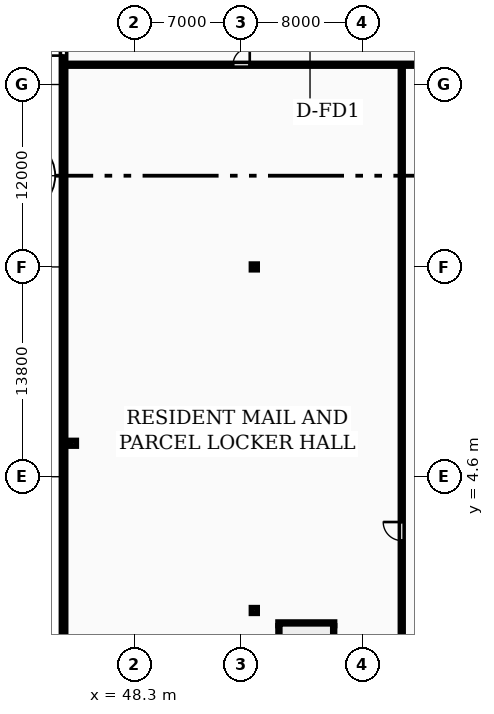
"""IFC4 building model, lengths in metres.
Left out: names, types, materials, properties, quantities, classifications, styles, units other than length and angle.
Written with IfcOpenShell. Run it as: python <this file> out.ifc"""

import sys

from ifc_helpers import new_model, si_unit, direction, frame, frame_2d, origin, origin_2d, place, context, subcontext, project, spatial, rectangle, i_section, extrude, element, fill, save


model = new_model("IFC4")
c1 = context("Model", 3, precision=1e-05, world=origin(), true_north=direction((0.0, 1.0)))
c2 = subcontext(c1, "Body", "Model", "MODEL_VIEW")
j1 = project(units=[si_unit("LENGTHUNIT", "METRE"), si_unit("PLANEANGLEUNIT", "RADIAN")], contexts=[c1])
p1 = place(None, origin())
s1 = spatial("IfcSite", under=j1, at=p1, CompositionType="ELEMENT")
p2 = place(p1, origin())
s2 = spatial("IfcBuilding", under=s1, at=p2, CompositionType="ELEMENT")
p3 = place(p2, origin())
s3 = spatial("IfcBuildingStorey", under=s2, at=p3, CompositionType="ELEMENT", Elevation=0.0)
for number, where, z_axis, x_axis in (
    (1, (56.2, -4.2, 0.0), (0.0, 0.0, 1.0), (1.0, 0.0, 0.0)),
    (2, (56.2, 18.4, 0.0), (0.0, 0.0, 1.0), (1.0, 0.0, 0.0)),
    (3, (44.3, 6.8, 0.0), (0.0, 0.0, 1.0), (1.0, 0.0, 0.0)),
):
    element("IfcColumn", number, at=place(p3, frame(where, z_axis=z_axis, x_axis=x_axis)), inside=s3, PredefinedType="COLUMN", context=c2, shape_type="SweptSolid", body=[
        extrude(i_section(OverallWidth=0.399, OverallDepth=0.394, WebThickness=0.023, FlangeThickness=0.037, FilletRadius=0.015, at=origin_2d()), origin(), (0.0, 0.0, 1.0), 5.4),
    ])
p4 = place(p3, frame((43.65, 109.2, 0.0), z_axis=(0.0, 0.0, 1.0), x_axis=(0.0, -1.0, 0.0)))
e4 = element("IfcWall", 4, at=p4, inside=s3, PredefinedType="STANDARD", context=c2, shape_type="SweptSolid", body=[
    extrude(rectangle(XDim=135.7, YDim=0.3, at=frame_2d((67.85, 0.0))), origin(), (0.0, 0.0, 1.0), 5.1),
])
p5 = place(p4, frame((75.1, 0.0, 0.0)))
e5 = element("IfcOpeningElement", 5, at=p5, cuts=e4, PredefinedType="OPENING", context=c2, shape_type="SweptSolid", body=[
    extrude(rectangle(XDim=1.8, YDim=2.2, at=frame_2d((0.9, 1.1))), frame((0.0, 0.16, 0.0), z_axis=(0.0, -1.0, 0.0), x_axis=(1.0, 0.0, 0.0)), (0.0, 0.0, 1.0), 0.32),
])
p6 = place(p4, frame((28.1, 0.0, 0.0)))
e6 = element("IfcOpeningElement", 6, at=p6, cuts=e4, PredefinedType="OPENING", context=c2, shape_type="SweptSolid", body=[
    extrude(rectangle(XDim=1.8, YDim=2.2, at=frame_2d((0.9, 1.1))), frame((0.0, 0.16, 0.0), z_axis=(0.0, -1.0, 0.0), x_axis=(1.0, 0.0, 0.0)), (0.0, 0.0, 1.0), 0.32),
])
p7 = place(p4, frame((36.0, 0.0, 0.0)))
e7 = element("IfcOpeningElement", 7, at=p7, cuts=e4, PredefinedType="OPENING", context=c2, shape_type="SweptSolid", body=[
    extrude(rectangle(XDim=2.0, YDim=2.6, at=frame_2d((1.0, 1.3))), frame((0.0, 0.16, 0.0), z_axis=(0.0, -1.0, 0.0), x_axis=(1.0, 0.0, 0.0)), (0.0, 0.0, 1.0), 0.32),
])
p8 = place(p4, frame((48.0, 0.0, 0.0)))
e8 = element("IfcOpeningElement", 8, at=p8, cuts=e4, PredefinedType="OPENING", context=c2, shape_type="SweptSolid", body=[
    extrude(rectangle(XDim=1.8, YDim=2.2, at=frame_2d((0.9, 1.1))), frame((0.0, 0.16, 0.0), z_axis=(0.0, -1.0, 0.0), x_axis=(1.0, 0.0, 0.0)), (0.0, 0.0, 1.0), 0.32),
])
p9 = place(p4, frame((122.8, 0.0, 0.0)))
e9 = element("IfcOpeningElement", 9, at=p9, cuts=e4, PredefinedType="OPENING", context=c2, shape_type="SweptSolid", body=[
    extrude(rectangle(XDim=1.8, YDim=2.2, at=frame_2d((0.9, 1.1))), frame((0.0, 0.16, 0.0), z_axis=(0.0, -1.0, 0.0), x_axis=(1.0, 0.0, 0.0)), (0.0, 0.0, 1.0), 0.32),
])
p10 = place(p3, frame((57.875, -12.8, 0.0), z_axis=(0.0, 0.0, 1.0), x_axis=(0.0, 1.0, 0.0)))
e10 = element("IfcWall", 10, at=p10, inside=s3, PredefinedType="SHEAR", context=c2, shape_type="SweptSolid", body=[
    extrude(rectangle(XDim=7.6, YDim=0.25, at=frame_2d((3.8, 0.0))), origin(), (0.0, 0.0, 1.0), 5.4),
])
p11 = place(p3, frame((57.75, -5.075, 0.0), z_axis=(0.0, 0.0, 1.0), x_axis=(1.0, 0.0, 0.0)))
e11 = element("IfcWall", 11, at=p11, inside=s3, PredefinedType="SHEAR", context=c2, shape_type="SweptSolid", body=[
    extrude(rectangle(XDim=3.74, YDim=0.25, at=frame_2d((1.87, 0.0))), origin(), (0.0, 0.0, 1.0), 5.4),
])
p12 = place(p3, frame((61.365, -12.8, 0.0), z_axis=(0.0, 0.0, 1.0), x_axis=(0.0, 1.0, 0.0)))
e12 = element("IfcWall", 12, at=p12, inside=s3, PredefinedType="SHEAR", context=c2, shape_type="SweptSolid", body=[
    extrude(rectangle(XDim=7.6, YDim=0.25, at=frame_2d((3.8, 0.0))), origin(), (0.0, 0.0, 1.0), 5.4),
])
p13 = place(p12, frame((0.4, 0.0, 0.0)))
e13 = element("IfcOpeningElement", 13, at=p13, cuts=e12, PredefinedType="OPENING", context=c2, shape_type="SweptSolid", body=[
    extrude(rectangle(XDim=1.1, YDim=2.1, at=frame_2d((0.55, 1.05))), frame((0.0, 0.135, 0.0), z_axis=(0.0, -1.0, 0.0), x_axis=(1.0, 0.0, 0.0)), (0.0, 0.0, 1.0), 0.27),
])
p14 = place(p3, frame((43.8, 31.7, 0.0), z_axis=(0.0, 0.0, 1.0), x_axis=(1.0, 0.0, 0.0)))
e14 = element("IfcWall", 14, at=p14, inside=s3, PredefinedType="PARTITIONING", context=c2, shape_type="SweptSolid", body=[
    extrude(rectangle(XDim=23.0, YDim=0.2, at=frame_2d((11.5, 0.0))), origin(), (0.0, 0.0, 1.0), 5.1),
])
p15 = place(p14, frame((11.0, 0.0, 0.0)))
e15 = element("IfcOpeningElement", 15, at=p15, cuts=e14, PredefinedType="OPENING", context=c2, shape_type="SweptSolid", body=[
    extrude(rectangle(XDim=1.1, YDim=2.1, at=frame_2d((0.55, 1.05))), frame((0.0, 0.11, 0.0), z_axis=(0.0, -1.0, 0.0), x_axis=(1.0, 0.0, 0.0)), (0.0, 0.0, 1.0), 0.22),
])
p16 = place(p3, frame((65.9, -21.6, 0.0), z_axis=(0.0, 0.0, 1.0), x_axis=(0.0, 1.0, 0.0)))
e16 = element("IfcWall", 16, at=p16, inside=s3, PredefinedType="PARTITIONING", context=c2, shape_type="SweptSolid", body=[
    extrude(rectangle(XDim=53.15, YDim=0.2, at=frame_2d((26.575, 0.0))), origin(), (0.0, 0.0, 1.0), 5.1),
])
p17 = place(p16, frame((22.0, 0.0, 0.0)))
e17 = element("IfcOpeningElement", 17, at=p17, cuts=e16, PredefinedType="OPENING", context=c2, shape_type="SweptSolid", body=[
    extrude(rectangle(XDim=1.22, YDim=2.18, at=frame_2d((0.61, 1.09))), frame((0.0, 0.11, 0.0), z_axis=(0.0, -1.0, 0.0), x_axis=(1.0, 0.0, 0.0)), (0.0, 0.0, 1.0), 0.22),
])
p18 = place(p5, frame((1.8, 0.0, 0.0), z_axis=(0.0, 0.0, 1.0), x_axis=(-1.0, 0.0, 0.0)))
e18 = element("IfcDoor", 18, at=p18, inside=s3, OperationType="DOUBLE_DOOR_SINGLE_SWING", PredefinedType="DOOR", context=c2, shape_type="SweptSolid", body=[
    extrude(rectangle(XDim=1.8, YDim=2.2, at=frame_2d((0.9, 1.1))), frame((0.0, 0.025, 0.0), z_axis=(0.0, -1.0, 0.0), x_axis=(1.0, 0.0, 0.0)), (0.0, 0.0, 1.0), 0.05),
])
fill(e5, e18)
p19 = place(p15, origin())
e19 = element("IfcDoor", 19, at=p19, inside=s3, OperationType="SINGLE_SWING_RIGHT", PredefinedType="DOOR", context=c2, shape_type="SweptSolid", body=[
    extrude(rectangle(XDim=1.1, YDim=2.1, at=frame_2d((0.55, 1.05))), frame((0.0, 0.025, 0.0), z_axis=(0.0, -1.0, 0.0), x_axis=(1.0, 0.0, 0.0)), (0.0, 0.0, 1.0), 0.05),
])
fill(e15, e19)
p20 = place(p17, origin())
e20 = element("IfcDoor", 20, at=p20, inside=s3, OperationType="SINGLE_SWING_RIGHT", PredefinedType="DOOR", context=c2, shape_type="SweptSolid", body=[
    extrude(rectangle(XDim=1.22, YDim=2.18, at=frame_2d((0.61, 1.09))), frame((0.0, 0.025, 0.0), z_axis=(0.0, -1.0, 0.0), x_axis=(1.0, 0.0, 0.0)), (0.0, 0.0, 1.0), 0.05),
])
fill(e17, e20)
save(model, sys.argv[1])
